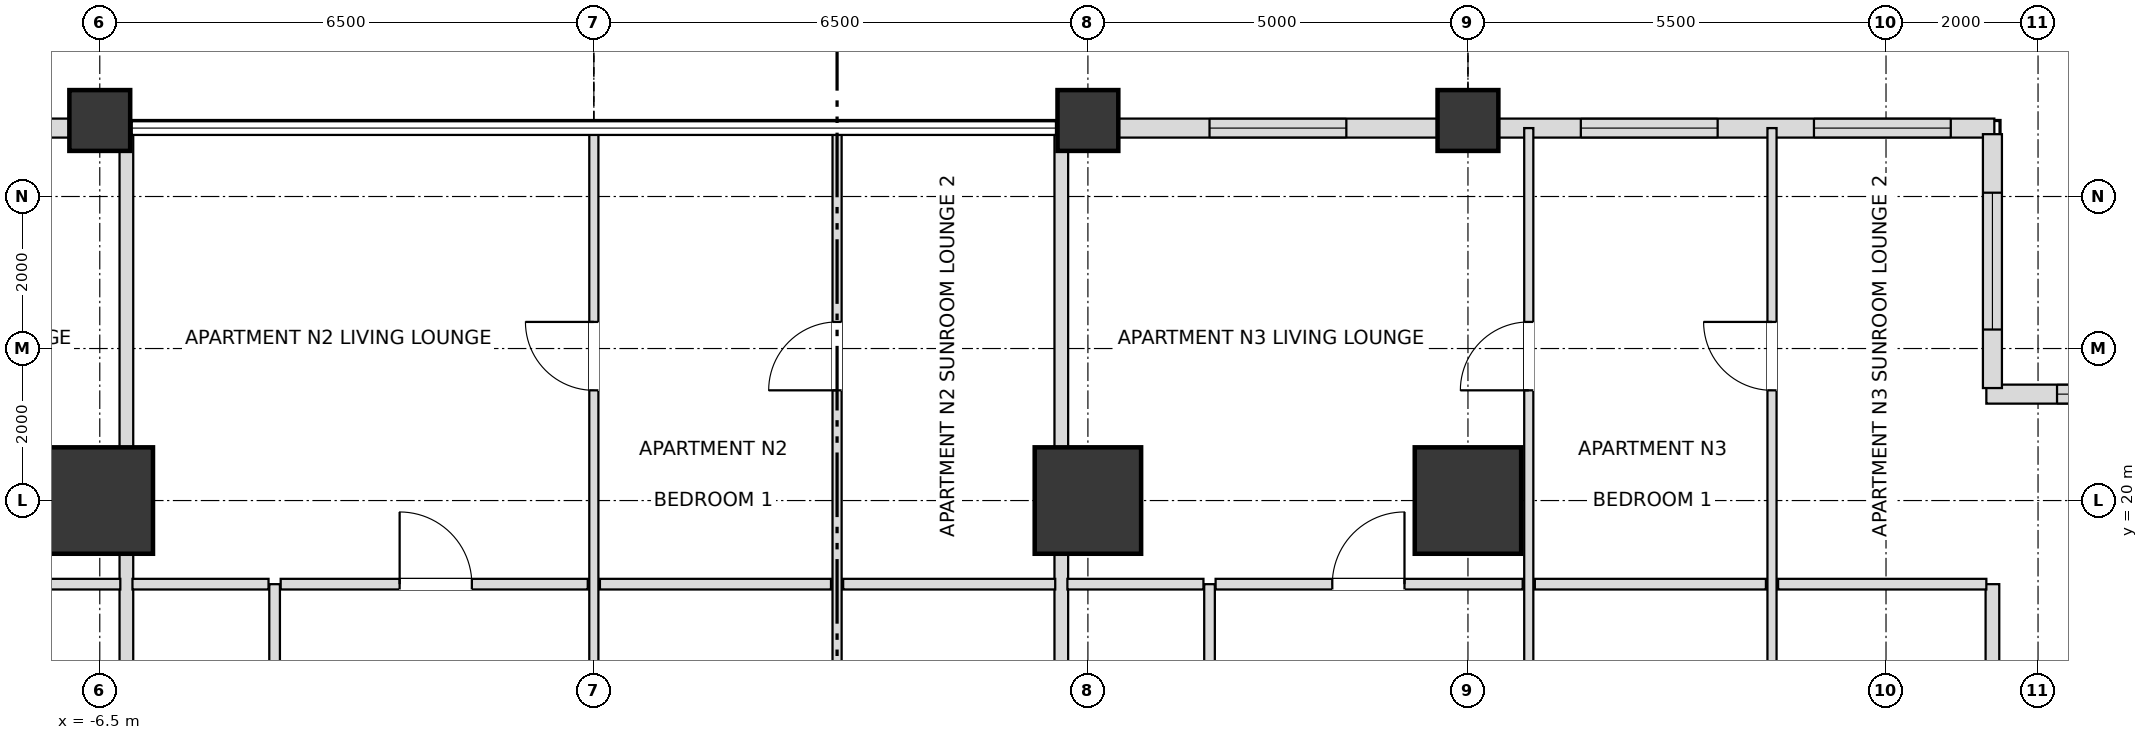
"""IFC4 building model, lengths in metres.
Left out: names, types, materials, properties, quantities, classifications, styles, units other than length and angle.
Written with IfcOpenShell. Run it as: python <this file> out.ifc"""

import sys

from ifc_helpers import new_model, si_unit, direction, frame, frame_2d, origin, origin_2d, place, context, subcontext, project, spatial, rectangle, extrude, element, fill, save


model = new_model("IFC4")
c1 = context("Model", 3, precision=1e-05, world=origin(), true_north=direction((0.0, 1.0)))
c2 = subcontext(c1, "Body", "Model", "MODEL_VIEW")
j1 = project(units=[si_unit("LENGTHUNIT", "METRE"), si_unit("PLANEANGLEUNIT", "RADIAN")], contexts=[c1])
p1 = place(None, origin())
s1 = spatial("IfcSite", under=j1, at=p1, CompositionType="ELEMENT")
p2 = place(p1, origin())
s2 = spatial("IfcBuilding", under=s1, at=p2, CompositionType="ELEMENT")
p3 = place(p2, frame((0.0, 0.0, 39.6)))
s3 = spatial("IfcBuildingStorey", under=s2, at=p3, CompositionType="ELEMENT", Elevation=39.6)
for number, where, z_axis, x_axis in (
    (1, (11.5, 20.0, 0.0), (0.0, 0.0, 1.0), (1.0, 0.0, 0.0)),
    (2, (6.5, 20.0, 0.0), (0.0, 0.0, 1.0), (1.0, 0.0, 0.0)),
    (3, (-6.5, 20.0, 0.0), (0.0, 0.0, 1.0), (1.0, 0.0, 0.0)),
):
    element("IfcColumn", number, at=place(p3, frame(where, z_axis=z_axis, x_axis=x_axis)), inside=s3, PredefinedType="USERDEFINED", context=c2, shape_type="SweptSolid", body=[
        extrude(rectangle(XDim=1.4, YDim=1.4, at=origin_2d()), origin(), (0.0, 0.0, 1.0), 3.6),
    ])
for number, where, z_axis, x_axis in (
    (4, (-6.5, 25.0, 0.0), (0.0, 0.0, 1.0), (1.0, 0.0, 0.0)),
    (5, (6.5, 25.0, 0.0), (0.0, 0.0, 1.0), (1.0, 0.0, 0.0)),
    (6, (11.5, 25.0, 0.0), (0.0, 0.0, 1.0), (1.0, 0.0, 0.0)),
):
    element("IfcColumn", number, at=place(p3, frame(where, z_axis=z_axis, x_axis=x_axis)), inside=s3, PredefinedType="COLUMN", context=c2, shape_type="SweptSolid", body=[
        extrude(rectangle(XDim=0.8, YDim=0.8, at=origin_2d()), origin(), (0.0, 0.0, 1.0), 3.6),
    ])
p4 = place(p3, frame((18.425, 24.9, 0.0), z_axis=(0.0, 0.0, 1.0), x_axis=(-1.0, 0.0, 0.0)))
e7 = element("IfcWall", 7, at=p4, inside=s3, PredefinedType="SOLIDWALL", context=c2, shape_type="SweptSolid", body=[
    extrude(rectangle(XDim=6.53, YDim=0.25, at=frame_2d((3.265, 0.0))), origin(), (0.0, 0.0, 1.0), 2.736),
])
p5 = place(p4, frame((0.573, 0.0, 0.72)))
e8 = element("IfcOpeningElement", 8, at=p5, cuts=e7, PredefinedType="OPENING", context=c2, shape_type="SweptSolid", body=[
    extrude(rectangle(XDim=1.8, YDim=1.68, at=frame_2d((0.9, 0.84))), frame((0.0, 0.135, 0.0), z_axis=(0.0, -1.0, 0.0), x_axis=(1.0, 0.0, 0.0)), (0.0, 0.0, 1.0), 0.27),
])
p6 = place(p4, frame((3.64, 0.0, 0.72)))
e9 = element("IfcOpeningElement", 9, at=p6, cuts=e7, PredefinedType="OPENING", context=c2, shape_type="SweptSolid", body=[
    extrude(rectangle(XDim=1.8, YDim=1.68, at=frame_2d((0.9, 0.84))), frame((0.0, 0.135, 0.0), z_axis=(0.0, -1.0, 0.0), x_axis=(1.0, 0.0, 0.0)), (0.0, 0.0, 1.0), 0.27),
])
p7 = place(p3, frame((11.105, 24.9, 0.0), z_axis=(0.0, 0.0, 1.0), x_axis=(-1.0, 0.0, 0.0)))
e10 = element("IfcWall", 10, at=p7, inside=s3, PredefinedType="SOLIDWALL", context=c2, shape_type="SweptSolid", body=[
    extrude(rectangle(XDim=4.21, YDim=0.25, at=frame_2d((2.105, 0.0))), origin(), (0.0, 0.0, 1.0), 2.736),
])
p8 = place(p7, frame((1.205, 0.0, 0.72)))
e11 = element("IfcOpeningElement", 11, at=p8, cuts=e10, PredefinedType="OPENING", context=c2, shape_type="SweptSolid", body=[
    extrude(rectangle(XDim=1.8, YDim=1.68, at=frame_2d((0.9, 0.84))), frame((0.0, 0.135, 0.0), z_axis=(0.0, -1.0, 0.0), x_axis=(1.0, 0.0, 0.0)), (0.0, 0.0, 1.0), 0.27),
])
p9 = place(p3, frame((-6.895, 24.9, 0.0), z_axis=(0.0, 0.0, 1.0), x_axis=(-1.0, 0.0, 0.0)))
e12 = element("IfcWall", 12, at=p9, inside=s3, PredefinedType="SOLIDWALL", context=c2, shape_type="SweptSolid", body=[
    extrude(rectangle(XDim=4.21, YDim=0.25, at=frame_2d((2.105, 0.0))), origin(), (0.0, 0.0, 1.0), 2.736),
])
p10 = place(p9, frame((1.205, 0.0, 0.72)))
e13 = element("IfcOpeningElement", 13, at=p10, cuts=e12, PredefinedType="OPENING", context=c2, shape_type="SweptSolid", body=[
    extrude(rectangle(XDim=1.8, YDim=1.68, at=frame_2d((0.9, 0.84))), frame((0.0, 0.135, 0.0), z_axis=(0.0, -1.0, 0.0), x_axis=(1.0, 0.0, 0.0)), (0.0, 0.0, 1.0), 0.27),
])
p11 = place(p3, frame((21.98, 21.4, 0.0), z_axis=(0.0, 0.0, 1.0), x_axis=(-1.0, 0.0, 0.0)))
e14 = element("IfcWall", 14, at=p11, inside=s3, PredefinedType="SOLIDWALL", context=c2, shape_type="SweptSolid", body=[
    extrude(rectangle(XDim=3.66, YDim=0.25, at=frame_2d((1.83, 0.0))), origin(), (0.0, 0.0, 1.0), 2.736),
])
p12 = place(p11, frame((0.93, 0.0, 0.72)))
e15 = element("IfcOpeningElement", 15, at=p12, cuts=e14, PredefinedType="OPENING", context=c2, shape_type="SweptSolid", body=[
    extrude(rectangle(XDim=1.8, YDim=1.68, at=frame_2d((0.9, 0.84))), frame((0.0, 0.135, 0.0), z_axis=(0.0, -1.0, 0.0), x_axis=(1.0, 0.0, 0.0)), (0.0, 0.0, 1.0), 0.27),
])
p13 = place(p3, frame((18.4, 21.48, 0.0), z_axis=(0.0, 0.0, 1.0), x_axis=(0.0, 1.0, 0.0)))
e16 = element("IfcWall", 16, at=p13, inside=s3, PredefinedType="SOLIDWALL", context=c2, shape_type="SweptSolid", body=[
    extrude(rectangle(XDim=3.34, YDim=0.25, at=frame_2d((1.67, 0.0))), origin(), (0.0, 0.0, 1.0), 2.736),
])
p14 = place(p13, frame((0.77, 0.0, 0.72)))
e17 = element("IfcOpeningElement", 17, at=p14, cuts=e16, PredefinedType="OPENING", context=c2, shape_type="SweptSolid", body=[
    extrude(rectangle(XDim=1.8, YDim=1.68, at=frame_2d((0.9, 0.84))), frame((0.0, 0.135, 0.0), z_axis=(0.0, -1.0, 0.0), x_axis=(1.0, 0.0, 0.0)), (0.0, 0.0, 1.0), 0.27),
])
p15 = place(p3, frame((-6.15, 9.3, 0.0), z_axis=(0.0, 0.0, 1.0), x_axis=(0.0, 1.0, 0.0)))
e18 = element("IfcWall", 18, at=p15, inside=s3, PredefinedType="PARTITIONING", context=c2, shape_type="SweptSolid", body=[
    extrude(rectangle(XDim=15.6, YDim=0.18, at=frame_2d((7.8, 0.0))), origin(), (0.0, 0.0, 1.0), 2.816),
])
p16 = place(p3, frame((-4.2, 9.3, 0.0), z_axis=(0.0, 0.0, 1.0), x_axis=(0.0, 1.0, 0.0)))
e19 = element("IfcWall", 19, at=p16, inside=s3, PredefinedType="PARTITIONING", context=c2, shape_type="SweptSolid", body=[
    extrude(rectangle(XDim=9.6, YDim=0.14, at=frame_2d((4.8, 0.0))), origin(), (0.0, 0.0, 1.0), 2.948),
])
p17 = place(p16, frame((4.35, 0.0, 0.0)))
e20 = element("IfcOpeningElement", 20, at=p17, cuts=e19, PredefinedType="OPENING", context=c2, shape_type="SweptSolid", body=[
    extrude(rectangle(XDim=0.9, YDim=2.1, at=frame_2d((0.45, 1.05))), frame((0.0, 0.08, 0.0), z_axis=(0.0, -1.0, 0.0), x_axis=(1.0, 0.0, 0.0)), (0.0, 0.0, 1.0), 0.16),
])
p18 = place(p3, frame((0.0, 9.3, 0.0), z_axis=(0.0, 0.0, 1.0), x_axis=(0.0, 1.0, 0.0)))
e21 = element("IfcWall", 21, at=p18, inside=s3, PredefinedType="PARTITIONING", context=c2, shape_type="SweptSolid", body=[
    extrude(rectangle(XDim=15.6, YDim=0.12, at=frame_2d((7.8, 0.0))), origin(), (0.0, 0.0, 1.0), 2.816),
])
p19 = place(p18, frame((4.325, 0.0, 0.0)))
e22 = element("IfcOpeningElement", 22, at=p19, cuts=e21, PredefinedType="OPENING", context=c2, shape_type="SweptSolid", body=[
    extrude(rectangle(XDim=0.95, YDim=2.1, at=frame_2d((0.475, 1.05))), frame((0.0, 0.07, 0.0), z_axis=(0.0, -1.0, 0.0), x_axis=(1.0, 0.0, 0.0)), (0.0, 0.0, 1.0), 0.14),
])
p20 = place(p18, frame((12.15, 0.0, 0.0)))
e23 = element("IfcOpeningElement", 23, at=p20, cuts=e21, PredefinedType="OPENING", context=c2, shape_type="SweptSolid", body=[
    extrude(rectangle(XDim=0.9, YDim=2.1, at=frame_2d((0.45, 1.05))), frame((0.0, 0.07, 0.0), z_axis=(0.0, -1.0, 0.0), x_axis=(1.0, 0.0, 0.0)), (0.0, 0.0, 1.0), 0.14),
])
p21 = place(p3, frame((3.2, 9.3, 0.0), z_axis=(0.0, 0.0, 1.0), x_axis=(0.0, 1.0, 0.0)))
e24 = element("IfcWall", 24, at=p21, inside=s3, PredefinedType="PARTITIONING", context=c2, shape_type="SweptSolid", body=[
    extrude(rectangle(XDim=15.6, YDim=0.12, at=frame_2d((7.8, 0.0))), origin(), (0.0, 0.0, 1.0), 2.816),
])
p22 = place(p21, frame((4.35, 0.0, 0.0)))
e25 = element("IfcOpeningElement", 25, at=p22, cuts=e24, PredefinedType="OPENING", context=c2, shape_type="SweptSolid", body=[
    extrude(rectangle(XDim=0.9, YDim=2.1, at=frame_2d((0.45, 1.05))), frame((0.0, 0.07, 0.0), z_axis=(0.0, -1.0, 0.0), x_axis=(1.0, 0.0, 0.0)), (0.0, 0.0, 1.0), 0.14),
])
p23 = place(p21, frame((12.15, 0.0, 0.0)))
e26 = element("IfcOpeningElement", 26, at=p23, cuts=e24, PredefinedType="OPENING", context=c2, shape_type="SweptSolid", body=[
    extrude(rectangle(XDim=0.9, YDim=2.1, at=frame_2d((0.45, 1.05))), frame((0.0, 0.07, 0.0), z_axis=(0.0, -1.0, 0.0), x_axis=(1.0, 0.0, 0.0)), (0.0, 0.0, 1.0), 0.14),
])
p24 = place(p3, frame((6.15, 9.3, 0.0), z_axis=(0.0, 0.0, 1.0), x_axis=(0.0, 1.0, 0.0)))
e27 = element("IfcWall", 27, at=p24, inside=s3, PredefinedType="PARTITIONING", context=c2, shape_type="SweptSolid", body=[
    extrude(rectangle(XDim=15.6, YDim=0.18, at=frame_2d((7.8, 0.0))), origin(), (0.0, 0.0, 1.0), 2.816),
])
p25 = place(p3, frame((8.1, 9.3, 0.0), z_axis=(0.0, 0.0, 1.0), x_axis=(0.0, 1.0, 0.0)))
e28 = element("IfcWall", 28, at=p25, inside=s3, PredefinedType="PARTITIONING", context=c2, shape_type="SweptSolid", body=[
    extrude(rectangle(XDim=9.6, YDim=0.14, at=frame_2d((4.8, 0.0))), origin(), (0.0, 0.0, 1.0), 2.816),
])
p26 = place(p25, frame((4.35, 0.0, 0.0)))
e29 = element("IfcOpeningElement", 29, at=p26, cuts=e28, PredefinedType="OPENING", context=c2, shape_type="SweptSolid", body=[
    extrude(rectangle(XDim=0.9, YDim=2.1, at=frame_2d((0.45, 1.05))), frame((0.0, 0.08, 0.0), z_axis=(0.0, -1.0, 0.0), x_axis=(1.0, 0.0, 0.0)), (0.0, 0.0, 1.0), 0.16),
])
p27 = place(p3, frame((12.3, 9.3, 0.0), z_axis=(0.0, 0.0, 1.0), x_axis=(0.0, 1.0, 0.0)))
e30 = element("IfcWall", 30, at=p27, inside=s3, PredefinedType="PARTITIONING", context=c2, shape_type="SweptSolid", body=[
    extrude(rectangle(XDim=15.6, YDim=0.12, at=frame_2d((7.8, 0.0))), origin(), (0.0, 0.0, 1.0), 2.736),
])
p28 = place(p27, frame((4.325, 0.0, 0.0)))
e31 = element("IfcOpeningElement", 31, at=p28, cuts=e30, PredefinedType="OPENING", context=c2, shape_type="SweptSolid", body=[
    extrude(rectangle(XDim=0.95, YDim=2.1, at=frame_2d((0.475, 1.05))), frame((0.0, 0.07, 0.0), z_axis=(0.0, -1.0, 0.0), x_axis=(1.0, 0.0, 0.0)), (0.0, 0.0, 1.0), 0.14),
])
p29 = place(p27, frame((12.15, 0.0, 0.0)))
e32 = element("IfcOpeningElement", 32, at=p29, cuts=e30, PredefinedType="OPENING", context=c2, shape_type="SweptSolid", body=[
    extrude(rectangle(XDim=0.9, YDim=2.1, at=frame_2d((0.45, 1.05))), frame((0.0, 0.07, 0.0), z_axis=(0.0, -1.0, 0.0), x_axis=(1.0, 0.0, 0.0)), (0.0, 0.0, 1.0), 0.14),
])
p30 = place(p3, frame((15.5, 9.3, 0.0), z_axis=(0.0, 0.0, 1.0), x_axis=(0.0, 1.0, 0.0)))
e33 = element("IfcWall", 33, at=p30, inside=s3, PredefinedType="PARTITIONING", context=c2, shape_type="SweptSolid", body=[
    extrude(rectangle(XDim=15.6, YDim=0.12, at=frame_2d((7.8, 0.0))), origin(), (0.0, 0.0, 1.0), 2.736),
])
p31 = place(p30, frame((4.478, 0.0, 0.0)))
e34 = element("IfcOpeningElement", 34, at=p31, cuts=e33, PredefinedType="OPENING", context=c2, shape_type="SweptSolid", body=[
    extrude(rectangle(XDim=0.9, YDim=2.1, at=frame_2d((0.45, 1.05))), frame((0.0, 0.07, 0.0), z_axis=(0.0, -1.0, 0.0), x_axis=(1.0, 0.0, 0.0)), (0.0, 0.0, 1.0), 0.14),
])
p32 = place(p30, frame((12.15, 0.0, 0.0)))
e35 = element("IfcOpeningElement", 35, at=p32, cuts=e33, PredefinedType="OPENING", context=c2, shape_type="SweptSolid", body=[
    extrude(rectangle(XDim=0.9, YDim=2.1, at=frame_2d((0.45, 1.05))), frame((0.0, 0.07, 0.0), z_axis=(0.0, -1.0, 0.0), x_axis=(1.0, 0.0, 0.0)), (0.0, 0.0, 1.0), 0.14),
])
p33 = place(p3, frame((18.4, 9.3, 0.0), z_axis=(0.0, 0.0, 1.0), x_axis=(0.0, 1.0, 0.0)))
e36 = element("IfcWall", 36, at=p33, inside=s3, PredefinedType="PARTITIONING", context=c2, shape_type="SweptSolid", body=[
    extrude(rectangle(XDim=9.6, YDim=0.18, at=frame_2d((4.8, 0.0))), origin(), (0.0, 0.0, 1.0), 2.736),
])
p34 = place(p3, frame((-8.02, 18.9, 0.0), z_axis=(0.0, 0.0, 1.0), x_axis=(1.0, 0.0, 0.0)))
e37 = element("IfcWall", 37, at=p34, inside=s3, PredefinedType="PARTITIONING", context=c2, shape_type="SweptSolid", body=[
    extrude(rectangle(XDim=1.79, YDim=0.14, at=frame_2d((0.895, 0.0))), origin(), (0.0, 0.0, 1.0), 2.816),
])
p35 = place(p3, frame((-6.07, 18.9, 0.0), z_axis=(0.0, 0.0, 1.0), x_axis=(1.0, 0.0, 0.0)))
e38 = element("IfcWall", 38, at=p35, inside=s3, PredefinedType="PARTITIONING", context=c2, shape_type="SweptSolid", body=[
    extrude(rectangle(XDim=1.79, YDim=0.14, at=frame_2d((0.895, 0.0))), origin(), (0.0, 0.0, 1.0), 3.38),
])
p36 = place(p3, frame((-4.12, 18.9, 0.0), z_axis=(0.0, 0.0, 1.0), x_axis=(1.0, 0.0, 0.0)))
e39 = element("IfcWall", 39, at=p36, inside=s3, PredefinedType="PARTITIONING", context=c2, shape_type="SweptSolid", body=[
    extrude(rectangle(XDim=4.04, YDim=0.14, at=frame_2d((2.02, 0.0))), origin(), (0.0, 0.0, 1.0), 3.38),
])
p37 = place(p36, frame((1.565, 0.0, 0.0)))
e40 = element("IfcOpeningElement", 40, at=p37, cuts=e39, PredefinedType="OPENING", context=c2, shape_type="SweptSolid", body=[
    extrude(rectangle(XDim=0.95, YDim=2.1, at=frame_2d((0.475, 1.05))), frame((0.0, 0.08, 0.0), z_axis=(0.0, -1.0, 0.0), x_axis=(1.0, 0.0, 0.0)), (0.0, 0.0, 1.0), 0.16),
])
p38 = place(p3, frame((0.08, 18.9, 0.0), z_axis=(0.0, 0.0, 1.0), x_axis=(1.0, 0.0, 0.0)))
e41 = element("IfcWall", 41, at=p38, inside=s3, PredefinedType="PARTITIONING", context=c2, shape_type="SweptSolid", body=[
    extrude(rectangle(XDim=3.04, YDim=0.14, at=frame_2d((1.52, 0.0))), origin(), (0.0, 0.0, 1.0), 3.38),
])
p39 = place(p3, frame((3.28, 18.9, 0.0), z_axis=(0.0, 0.0, 1.0), x_axis=(1.0, 0.0, 0.0)))
e42 = element("IfcWall", 42, at=p39, inside=s3, PredefinedType="PARTITIONING", context=c2, shape_type="SweptSolid", body=[
    extrude(rectangle(XDim=2.79, YDim=0.14, at=frame_2d((1.395, 0.0))), origin(), (0.0, 0.0, 1.0), 3.38),
])
p40 = place(p3, frame((6.23, 18.9, 0.0), z_axis=(0.0, 0.0, 1.0), x_axis=(1.0, 0.0, 0.0)))
e43 = element("IfcWall", 43, at=p40, inside=s3, PredefinedType="PARTITIONING", context=c2, shape_type="SweptSolid", body=[
    extrude(rectangle(XDim=1.79, YDim=0.14, at=frame_2d((0.895, 0.0))), origin(), (0.0, 0.0, 1.0), 2.816),
])
p41 = place(p3, frame((8.18, 18.9, 0.0), z_axis=(0.0, 0.0, 1.0), x_axis=(1.0, 0.0, 0.0)))
e44 = element("IfcWall", 44, at=p41, inside=s3, PredefinedType="PARTITIONING", context=c2, shape_type="SweptSolid", body=[
    extrude(rectangle(XDim=4.04, YDim=0.14, at=frame_2d((2.02, 0.0))), origin(), (0.0, 0.0, 1.0), 2.736),
])
p42 = place(p41, frame((1.535, 0.0, 0.0)))
e45 = element("IfcOpeningElement", 45, at=p42, cuts=e44, PredefinedType="OPENING", context=c2, shape_type="SweptSolid", body=[
    extrude(rectangle(XDim=0.95, YDim=2.1, at=frame_2d((0.475, 1.05))), frame((0.0, 0.08, 0.0), z_axis=(0.0, -1.0, 0.0), x_axis=(1.0, 0.0, 0.0)), (0.0, 0.0, 1.0), 0.16),
])
p43 = place(p3, frame((12.38, 18.9, 0.0), z_axis=(0.0, 0.0, 1.0), x_axis=(1.0, 0.0, 0.0)))
e46 = element("IfcWall", 46, at=p43, inside=s3, PredefinedType="PARTITIONING", context=c2, shape_type="SweptSolid", body=[
    extrude(rectangle(XDim=3.04, YDim=0.14, at=frame_2d((1.52, 0.0))), origin(), (0.0, 0.0, 1.0), 2.736),
])
p44 = place(p3, frame((15.58, 18.9, 0.0), z_axis=(0.0, 0.0, 1.0), x_axis=(1.0, 0.0, 0.0)))
e47 = element("IfcWall", 47, at=p44, inside=s3, PredefinedType="PARTITIONING", context=c2, shape_type="SweptSolid", body=[
    extrude(rectangle(XDim=2.74, YDim=0.14, at=frame_2d((1.37, 0.0))), origin(), (0.0, 0.0, 1.0), 2.736),
])
p45 = place(p5, origin())
e48 = element("IfcWindow", 48, at=p45, inside=s3, PartitioningType="SINGLE_PANEL", PredefinedType="WINDOW", context=c2, shape_type="SweptSolid", body=[
    extrude(rectangle(XDim=1.8, YDim=1.68, at=frame_2d((0.9, 0.84))), frame((0.0, 0.03, 0.0), z_axis=(0.0, -1.0, 0.0), x_axis=(1.0, 0.0, 0.0)), (0.0, 0.0, 1.0), 0.06),
])
fill(e8, e48)
p46 = place(p6, origin())
e49 = element("IfcWindow", 49, at=p46, inside=s3, PartitioningType="SINGLE_PANEL", PredefinedType="WINDOW", context=c2, shape_type="SweptSolid", body=[
    extrude(rectangle(XDim=1.8, YDim=1.68, at=frame_2d((0.9, 0.84))), frame((0.0, 0.03, 0.0), z_axis=(0.0, -1.0, 0.0), x_axis=(1.0, 0.0, 0.0)), (0.0, 0.0, 1.0), 0.06),
])
fill(e9, e49)
p47 = place(p8, origin())
e50 = element("IfcWindow", 50, at=p47, inside=s3, PartitioningType="SINGLE_PANEL", PredefinedType="WINDOW", context=c2, shape_type="SweptSolid", body=[
    extrude(rectangle(XDim=1.8, YDim=1.68, at=frame_2d((0.9, 0.84))), frame((0.0, 0.03, 0.0), z_axis=(0.0, -1.0, 0.0), x_axis=(1.0, 0.0, 0.0)), (0.0, 0.0, 1.0), 0.06),
])
fill(e11, e50)
p48 = place(p12, origin())
e51 = element("IfcWindow", 51, at=p48, inside=s3, PartitioningType="SINGLE_PANEL", PredefinedType="WINDOW", context=c2, shape_type="SweptSolid", body=[
    extrude(rectangle(XDim=1.8, YDim=1.68, at=frame_2d((0.9, 0.84))), frame((0.0, 0.03, 0.0), z_axis=(0.0, -1.0, 0.0), x_axis=(1.0, 0.0, 0.0)), (0.0, 0.0, 1.0), 0.06),
])
fill(e15, e51)
p49 = place(p14, origin())
e52 = element("IfcWindow", 52, at=p49, inside=s3, PartitioningType="SINGLE_PANEL", PredefinedType="WINDOW", context=c2, shape_type="SweptSolid", body=[
    extrude(rectangle(XDim=1.8, YDim=1.68, at=frame_2d((0.9, 0.84))), frame((0.0, 0.03, 0.0), z_axis=(0.0, -1.0, 0.0), x_axis=(1.0, 0.0, 0.0)), (0.0, 0.0, 1.0), 0.06),
])
fill(e17, e52)
p50 = place(p37, origin())
e53 = element("IfcDoor", 53, at=p50, inside=s3, OperationType="SINGLE_SWING_LEFT", PredefinedType="DOOR", context=c2, shape_type="SweptSolid", body=[
    extrude(rectangle(XDim=0.95, YDim=2.1, at=frame_2d((0.475, 1.05))), frame((0.0, 0.025, 0.0), z_axis=(0.0, -1.0, 0.0), x_axis=(1.0, 0.0, 0.0)), (0.0, 0.0, 1.0), 0.05),
])
fill(e40, e53)
p51 = place(p20, origin())
e54 = element("IfcDoor", 54, at=p51, inside=s3, OperationType="SINGLE_SWING_RIGHT", PredefinedType="DOOR", context=c2, shape_type="SweptSolid", body=[
    extrude(rectangle(XDim=0.9, YDim=2.1, at=frame_2d((0.45, 1.05))), frame((0.0, 0.025, 0.0), z_axis=(0.0, -1.0, 0.0), x_axis=(1.0, 0.0, 0.0)), (0.0, 0.0, 1.0), 0.05),
])
fill(e23, e54)
p52 = place(p23, origin())
e55 = element("IfcDoor", 55, at=p52, inside=s3, OperationType="SINGLE_SWING_LEFT", PredefinedType="DOOR", context=c2, shape_type="SweptSolid", body=[
    extrude(rectangle(XDim=0.9, YDim=2.1, at=frame_2d((0.45, 1.05))), frame((0.0, 0.025, 0.0), z_axis=(0.0, -1.0, 0.0), x_axis=(1.0, 0.0, 0.0)), (0.0, 0.0, 1.0), 0.05),
])
fill(e26, e55)
p53 = place(p42, origin())
e56 = element("IfcDoor", 56, at=p53, inside=s3, OperationType="SINGLE_SWING_RIGHT", PredefinedType="DOOR", context=c2, shape_type="SweptSolid", body=[
    extrude(rectangle(XDim=0.95, YDim=2.1, at=frame_2d((0.475, 1.05))), frame((0.0, 0.025, 0.0), z_axis=(0.0, -1.0, 0.0), x_axis=(1.0, 0.0, 0.0)), (0.0, 0.0, 1.0), 0.05),
])
fill(e45, e56)
p54 = place(p29, origin())
e57 = element("IfcDoor", 57, at=p54, inside=s3, OperationType="SINGLE_SWING_LEFT", PredefinedType="DOOR", context=c2, shape_type="SweptSolid", body=[
    extrude(rectangle(XDim=0.9, YDim=2.1, at=frame_2d((0.45, 1.05))), frame((0.0, 0.025, 0.0), z_axis=(0.0, -1.0, 0.0), x_axis=(1.0, 0.0, 0.0)), (0.0, 0.0, 1.0), 0.05),
])
fill(e32, e57)
p55 = place(p32, origin())
e58 = element("IfcDoor", 58, at=p55, inside=s3, OperationType="SINGLE_SWING_RIGHT", PredefinedType="DOOR", context=c2, shape_type="SweptSolid", body=[
    extrude(rectangle(XDim=0.9, YDim=2.1, at=frame_2d((0.45, 1.05))), frame((0.0, 0.025, 0.0), z_axis=(0.0, -1.0, 0.0), x_axis=(1.0, 0.0, 0.0)), (0.0, 0.0, 1.0), 0.05),
])
fill(e35, e58)
save(model, sys.argv[1])
